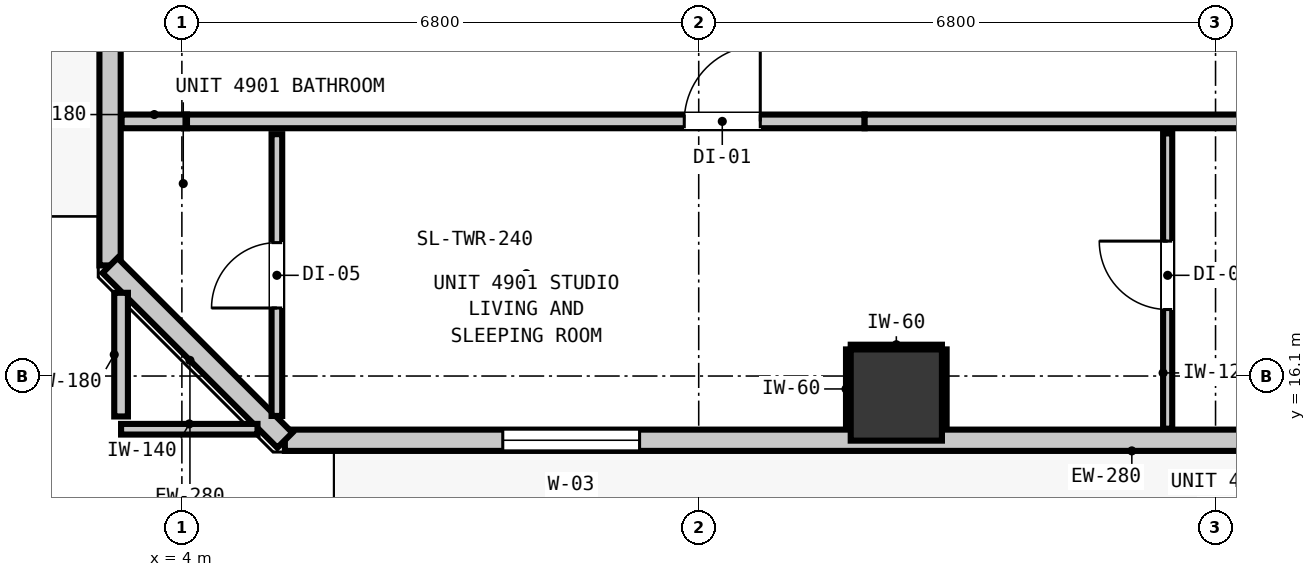
"""IFC4 building model, lengths in metres.
Left out: names, types, materials, properties, quantities, classifications, styles, units other than length and angle.
Written with IfcOpenShell. Run it as: python <this file> out.ifc"""

import sys

from ifc_helpers import new_model, si_unit, direction, frame, frame_2d, origin, origin_2d, place, context, subcontext, project, spatial, rectangle, extrude, element, fill, save


model = new_model("IFC4")
c1 = context("Model", 3, precision=1e-05, world=origin(), true_north=direction((0.0, 1.0)))
c2 = subcontext(c1, "Body", "Model", "MODEL_VIEW")
j1 = project(units=[si_unit("LENGTHUNIT", "METRE"), si_unit("PLANEANGLEUNIT", "RADIAN")], contexts=[c1])
p1 = place(None, origin())
s1 = spatial("IfcSite", under=j1, at=p1, CompositionType="ELEMENT")
p2 = place(p1, origin())
s2 = spatial("IfcBuilding", under=s1, at=p2, CompositionType="ELEMENT")
p3 = place(p2, frame((0.0, 0.0, 169.16)))
s3 = spatial("IfcBuildingStorey", under=s2, at=p3, CompositionType="ELEMENT", Elevation=169.16)
p4 = place(p3, frame((13.4, 15.85, 0.0), z_axis=(0.0, 0.0, 1.0), x_axis=(1.0, 0.0, 0.0)))
e1 = element("IfcColumn", 1, at=p4, inside=s3, PredefinedType="COLUMN", context=c2, shape_type="SweptSolid", body=[
    extrude(rectangle(XDim=1.2, YDim=1.2, at=origin_2d()), origin(), (0.0, 0.0, 1.0), 3.32),
])
p5 = place(p3, frame((3.055, 17.555, 0.0), z_axis=(0.0, 0.0, 1.0), x_axis=(0.0, 1.0, 0.0)))
e2 = element("IfcWall", 2, at=p5, inside=s3, PredefinedType="STANDARD", context=c2, shape_type="SweptSolid", body=[
    extrude(rectangle(XDim=32.29, YDim=0.28, at=frame_2d((16.145, 0.0))), origin(), (0.0, 0.0, 1.0), 2.96),
])
p6 = place(p5, frame((6.871, 0.0, 0.0)))
e3 = element("IfcOpeningElement", 3, at=p6, cuts=e2, PredefinedType="OPENING", context=c2, shape_type="SweptSolid", body=[
    extrude(rectangle(XDim=1.0, YDim=2.15, at=frame_2d((0.5, 1.075))), frame((0.0, 0.15, 0.0), z_axis=(0.0, -1.0, 0.0), x_axis=(1.0, 0.0, 0.0)), (0.0, 0.0, 1.0), 0.3),
])
p7 = place(p5, frame((30.753, 0.0, 0.85)))
e4 = element("IfcOpeningElement", 4, at=p7, cuts=e2, PredefinedType="OPENING", context=c2, shape_type="SweptSolid", body=[
    extrude(rectangle(XDim=1.05, YDim=1.65, at=frame_2d((0.525, 0.825))), frame((0.0, 0.15, 0.0), z_axis=(0.0, -1.0, 0.0), x_axis=(1.0, 0.0, 0.0)), (0.0, 0.0, 1.0), 0.3),
])
p8 = place(p5, frame((8.6, 0.0, 0.85)))
e5 = element("IfcOpeningElement", 5, at=p8, cuts=e2, PredefinedType="OPENING", context=c2, shape_type="SweptSolid", body=[
    extrude(rectangle(XDim=1.05, YDim=1.65, at=frame_2d((0.525, 0.825))), frame((0.0, 0.15, 0.0), z_axis=(0.0, -1.0, 0.0), x_axis=(1.0, 0.0, 0.0)), (0.0, 0.0, 1.0), 0.3),
])
p9 = place(p5, frame((10.612, 0.0, 0.85)))
e6 = element("IfcOpeningElement", 6, at=p9, cuts=e2, PredefinedType="OPENING", context=c2, shape_type="SweptSolid", body=[
    extrude(rectangle(XDim=1.8, YDim=1.9, at=frame_2d((0.9, 0.95))), frame((0.0, 0.15, 0.0), z_axis=(0.0, -1.0, 0.0), x_axis=(1.0, 0.0, 0.0)), (0.0, 0.0, 1.0), 0.3),
])
p10 = place(p5, frame((16.925, 0.0, 0.85)))
e7 = element("IfcOpeningElement", 7, at=p10, cuts=e2, PredefinedType="OPENING", context=c2, shape_type="SweptSolid", body=[
    extrude(rectangle(XDim=1.8, YDim=1.9, at=frame_2d((0.9, 0.95))), frame((0.0, 0.15, 0.0), z_axis=(0.0, -1.0, 0.0), x_axis=(1.0, 0.0, 0.0)), (0.0, 0.0, 1.0), 0.3),
])
p11 = place(p5, frame((20.113, 0.0, 0.85)))
e8 = element("IfcOpeningElement", 8, at=p11, cuts=e2, PredefinedType="OPENING", context=c2, shape_type="SweptSolid", body=[
    extrude(rectangle(XDim=1.05, YDim=1.65, at=frame_2d((0.525, 0.825))), frame((0.0, 0.15, 0.0), z_axis=(0.0, -1.0, 0.0), x_axis=(1.0, 0.0, 0.0)), (0.0, 0.0, 1.0), 0.3),
])
p12 = place(p3, frame((40.445, 15.255, 0.0), z_axis=(0.0, 0.0, 1.0), x_axis=(-1.0, 0.0, 0.0)))
e9 = element("IfcWall", 9, at=p12, inside=s3, PredefinedType="STANDARD", context=c2, shape_type="SweptSolid", body=[
    extrude(rectangle(XDim=35.09, YDim=0.28, at=frame_2d((17.545, 0.0))), origin(), (0.0, 0.0, 1.0), 2.96),
])
p13 = place(p12, frame((0.904, 0.0, 0.0)))
e10 = element("IfcOpeningElement", 10, at=p13, cuts=e9, PredefinedType="OPENING", context=c2, shape_type="SweptSolid", body=[
    extrude(rectangle(XDim=1.0, YDim=2.15, at=frame_2d((0.5, 1.075))), frame((0.0, 0.15, 0.0), z_axis=(0.0, -1.0, 0.0), x_axis=(1.0, 0.0, 0.0)), (0.0, 0.0, 1.0), 0.3),
])
p14 = place(p12, frame((30.423, 0.0, 0.85)))
e11 = element("IfcOpeningElement", 11, at=p14, cuts=e9, PredefinedType="OPENING", context=c2, shape_type="SweptSolid", body=[
    extrude(rectangle(XDim=1.8, YDim=1.9, at=frame_2d((0.9, 0.95))), frame((0.0, 0.15, 0.0), z_axis=(0.0, -1.0, 0.0), x_axis=(1.0, 0.0, 0.0)), (0.0, 0.0, 1.0), 0.3),
])
p15 = place(p12, frame((15.67, 0.0, 0.85)))
e12 = element("IfcOpeningElement", 12, at=p15, cuts=e9, PredefinedType="OPENING", context=c2, shape_type="SweptSolid", body=[
    extrude(rectangle(XDim=1.8, YDim=1.9, at=frame_2d((0.9, 0.95))), frame((0.0, 0.15, 0.0), z_axis=(0.0, -1.0, 0.0), x_axis=(1.0, 0.0, 0.0)), (0.0, 0.0, 1.0), 0.3),
])
p16 = place(p12, frame((6.155, 0.0, 0.85)))
e13 = element("IfcOpeningElement", 13, at=p16, cuts=e9, PredefinedType="OPENING", context=c2, shape_type="SweptSolid", body=[
    extrude(rectangle(XDim=1.8, YDim=1.9, at=frame_2d((0.9, 0.95))), frame((0.0, 0.15, 0.0), z_axis=(0.0, -1.0, 0.0), x_axis=(1.0, 0.0, 0.0)), (0.0, 0.0, 1.0), 0.3),
])
p17 = place(p3, frame((5.355, 15.255, 0.0), z_axis=(0.0, 0.0, 1.0), x_axis=(-0.707106781187, 0.707106781187, 0.0)))
e14 = element("IfcWall", 14, at=p17, inside=s3, PredefinedType="STANDARD", context=c2, shape_type="SweptSolid", body=[
    extrude(rectangle(XDim=3.253, YDim=0.28, at=frame_2d((1.626, 0.0))), origin(), (0.0, 0.0, 1.0), 2.96),
])
p18 = place(p3, frame((3.207, 19.45, 0.0), z_axis=(0.0, 0.0, 1.0), x_axis=(1.0, 0.0, 0.0)))
e15 = element("IfcWall", 15, at=p18, inside=s3, PredefinedType="PARTITIONING", context=c2, shape_type="SweptSolid", body=[
    extrude(rectangle(XDim=0.86, YDim=0.18, at=frame_2d((0.43, 0.0))), origin(), (0.0, 0.0, 1.0), 2.96),
])
p19 = place(p3, frame((4.067, 19.45, 0.0), z_axis=(0.0, 0.0, 1.0), x_axis=(1.0, 0.0, 0.0)))
e16 = element("IfcWall", 16, at=p19, inside=s3, PredefinedType="PARTITIONING", context=c2, shape_type="SweptSolid", body=[
    extrude(rectangle(XDim=8.916, YDim=0.18, at=frame_2d((4.458, 0.0))), origin(), (0.0, 0.0, 1.0), 2.445),
])
p20 = place(p19, frame((6.543, 0.0, 0.0)))
e17 = element("IfcOpeningElement", 17, at=p20, cuts=e16, PredefinedType="OPENING", context=c2, shape_type="SweptSolid", body=[
    extrude(rectangle(XDim=1.0, YDim=2.15, at=frame_2d((0.5, 1.075))), frame((0.0, 0.1, 0.0), z_axis=(0.0, -1.0, 0.0), x_axis=(1.0, 0.0, 0.0)), (0.0, 0.0, 1.0), 0.2),
])
p21 = place(p3, frame((12.983, 19.45, 0.0), z_axis=(0.0, 0.0, 1.0), x_axis=(1.0, 0.0, 0.0)))
e18 = element("IfcWall", 18, at=p21, inside=s3, PredefinedType="PARTITIONING", context=c2, shape_type="SweptSolid", body=[
    extrude(rectangle(XDim=29.61, YDim=0.18, at=frame_2d((14.805, 0.0))), origin(), (0.0, 0.0, 1.0), 2.96),
])
p22 = place(p21, frame((10.392, 0.0, 0.0)))
e19 = element("IfcOpeningElement", 19, at=p22, cuts=e18, PredefinedType="OPENING", context=c2, shape_type="SweptSolid", body=[
    extrude(rectangle(XDim=1.0, YDim=2.15, at=frame_2d((0.5, 1.075))), frame((0.0, 0.1, 0.0), z_axis=(0.0, -1.0, 0.0), x_axis=(1.0, 0.0, 0.0)), (0.0, 0.0, 1.0), 0.2),
])
p23 = place(p21, frame((22.132, 0.0, 0.0)))
e20 = element("IfcOpeningElement", 20, at=p23, cuts=e18, PredefinedType="OPENING", context=c2, shape_type="SweptSolid", body=[
    extrude(rectangle(XDim=1.0, YDim=2.15, at=frame_2d((0.5, 1.075))), frame((0.0, 0.1, 0.0), z_axis=(0.0, -1.0, 0.0), x_axis=(1.0, 0.0, 0.0)), (0.0, 0.0, 1.0), 0.2),
])
p24 = place(p3, frame((3.2, 15.4, 0.0), z_axis=(0.0, 0.0, 1.0), x_axis=(1.0, 0.0, 0.0)))
e21 = element("IfcWall", 21, at=p24, inside=s3, PredefinedType="PARTITIONING", context=c2, shape_type="SweptSolid", body=[
    extrude(rectangle(XDim=1.795, YDim=0.14, at=frame_2d((0.897, 0.0))), origin(), (0.0, 0.0, 1.0), 2.96),
])
p25 = place(p3, frame((3.2, 15.568, 0.0), z_axis=(0.0, 0.0, 1.0), x_axis=(0.0, 1.0, 0.0)))
e22 = element("IfcWall", 22, at=p25, inside=s3, PredefinedType="PARTITIONING", context=c2, shape_type="SweptSolid", body=[
    extrude(rectangle(XDim=1.627, YDim=0.18, at=frame_2d((0.813, 0.0))), origin(), (0.0, 0.0, 1.0), 2.96),
])
p26 = place(p3, frame((5.25, 15.575, 0.0), z_axis=(0.0, 0.0, 1.0), x_axis=(0.0, 1.0, 0.0)))
e23 = element("IfcWall", 23, at=p26, inside=s3, PredefinedType="PARTITIONING", context=c2, shape_type="SweptSolid", body=[
    extrude(rectangle(XDim=3.707, YDim=0.14, at=frame_2d((1.854, 0.0))), origin(), (0.0, 0.0, 1.0), 2.96),
])
p27 = place(p26, frame((1.42, 0.0, 0.0)))
e24 = element("IfcOpeningElement", 24, at=p27, cuts=e23, PredefinedType="OPENING", context=c2, shape_type="SweptSolid", body=[
    extrude(rectangle(XDim=0.86, YDim=2.02, at=frame_2d((0.43, 1.01))), frame((0.0, 0.08, 0.0), z_axis=(0.0, -1.0, 0.0), x_axis=(1.0, 0.0, 0.0)), (0.0, 0.0, 1.0), 0.16),
])
p28 = place(p3, frame((16.97, 15.407, 0.0), z_axis=(0.0, 0.0, 1.0), x_axis=(0.0, 1.0, 0.0)))
e25 = element("IfcWall", 25, at=p28, inside=s3, PredefinedType="PARTITIONING", context=c2, shape_type="SweptSolid", body=[
    extrude(rectangle(XDim=3.885, YDim=0.12, at=frame_2d((1.942, 0.0))), origin(), (0.0, 0.0, 1.0), 2.96),
])
p29 = place(p28, frame((1.568, 0.0, 0.0)))
e26 = element("IfcOpeningElement", 26, at=p29, cuts=e25, PredefinedType="OPENING", context=c2, shape_type="SweptSolid", body=[
    extrude(rectangle(XDim=0.9, YDim=2.1, at=frame_2d((0.45, 1.05))), frame((0.0, 0.07, 0.0), z_axis=(0.0, -1.0, 0.0), x_axis=(1.0, 0.0, 0.0)), (0.0, 0.0, 1.0), 0.14),
])
p30 = place(p3, frame((12.8, 16.482, 0.0), z_axis=(0.0, 0.0, 1.0), x_axis=(1.0, 0.0, 0.0)))
e27 = element("IfcWall", 27, at=p30, inside=s3, PredefinedType="PARTITIONING", context=c2, shape_type="SweptSolid", body=[
    extrude(rectangle(XDim=1.2, YDim=0.06, at=frame_2d((0.6, 0.0))), origin(), (0.0, 0.0, 1.0), 1.45),
])
for number, where, z_axis, x_axis in (
    (28, (12.768, 15.41, 0.0), (0.0, 0.0, 1.0), (0.0, 1.0, 0.0)),
    (29, (14.032, 15.41, 0.0), (0.0, 0.0, 1.0), (0.0, 1.0, 0.0)),
):
    element("IfcWall", number, at=place(p3, frame(where, z_axis=z_axis, x_axis=x_axis)), inside=s3, PredefinedType="PARTITIONING", context=c2, shape_type="SweptSolid", body=[
        extrude(rectangle(XDim=1.04, YDim=0.06, at=frame_2d((0.52, 0.0))), origin(), (0.0, 0.0, 1.0), 1.45),
    ])
p31 = place(p14, origin())
e30 = element("IfcWindow", 30, at=p31, inside=s3, PartitioningType="SINGLE_PANEL", PredefinedType="WINDOW", context=c2, shape_type="SweptSolid", body=[
    extrude(rectangle(XDim=1.8, YDim=1.9, at=frame_2d((0.9, 0.95))), frame((0.0, 0.03, 0.0), z_axis=(0.0, -1.0, 0.0), x_axis=(1.0, 0.0, 0.0)), (0.0, 0.0, 1.0), 0.06),
])
fill(e11, e30)
p32 = place(p20, origin())
e31 = element("IfcDoor", 31, at=p32, inside=s3, OperationType="SINGLE_SWING_RIGHT", PredefinedType="DOOR", context=c2, shape_type="SweptSolid", body=[
    extrude(rectangle(XDim=1.0, YDim=2.15, at=frame_2d((0.5, 1.075))), frame((0.0, 0.025, 0.0), z_axis=(0.0, -1.0, 0.0), x_axis=(1.0, 0.0, 0.0)), (0.0, 0.0, 1.0), 0.05),
])
fill(e17, e31)
p33 = place(p27, origin())
e32 = element("IfcDoor", 32, at=p33, inside=s3, OperationType="SINGLE_SWING_LEFT", PredefinedType="DOOR", context=c2, shape_type="SweptSolid", body=[
    extrude(rectangle(XDim=0.86, YDim=2.02, at=frame_2d((0.43, 1.01))), frame((0.0, 0.025, 0.0), z_axis=(0.0, -1.0, 0.0), x_axis=(1.0, 0.0, 0.0)), (0.0, 0.0, 1.0), 0.05),
])
fill(e24, e32)
p34 = place(p29, origin())
e33 = element("IfcDoor", 33, at=p34, inside=s3, OperationType="SINGLE_SWING_RIGHT", PredefinedType="DOOR", context=c2, shape_type="SweptSolid", body=[
    extrude(rectangle(XDim=0.9, YDim=2.1, at=frame_2d((0.45, 1.05))), frame((0.0, 0.025, 0.0), z_axis=(0.0, -1.0, 0.0), x_axis=(1.0, 0.0, 0.0)), (0.0, 0.0, 1.0), 0.05),
])
fill(e26, e33)
save(model, sys.argv[1])
